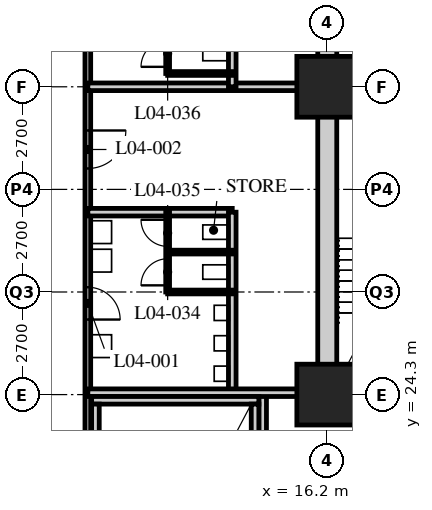
"""IFC4 building model, lengths in metres.
Left out: names, types, materials, properties, quantities, classifications, styles, units other than length and angle.
Written with IfcOpenShell. Run it as: python <this file> out.ifc"""

import sys

from ifc_helpers import new_model, si_unit, direction, frame, frame_2d, origin, origin_2d, place, context, subcontext, project, spatial, rectangle, hollow_rectangle, extrude, element, fill, save


model = new_model("IFC4")
c1 = context("Model", 3, precision=1e-05, world=origin(), true_north=direction((0.0, 1.0)))
c2 = subcontext(c1, "Body", "Model", "MODEL_VIEW")
j1 = project(units=[si_unit("LENGTHUNIT", "METRE"), si_unit("PLANEANGLEUNIT", "RADIAN")], contexts=[c1])
p1 = place(None, origin())
s1 = spatial("IfcSite", under=j1, at=p1, CompositionType="ELEMENT")
p2 = place(p1, origin())
s2 = spatial("IfcBuilding", under=s1, at=p2, CompositionType="ELEMENT")
p3 = place(p2, frame((0.0, 0.0, 22.2)))
s3 = spatial("IfcBuildingStorey", under=s2, at=p3, CompositionType="ELEMENT", Elevation=22.2)
for number, where, z_axis, x_axis in (
    (1, (16.2, 24.3, 0.0), (0.0, 0.0, 1.0), (1.0, 0.0, 0.0)),
    (2, (16.2, 32.4, 0.0), (0.0, 0.0, 1.0), (1.0, 0.0, 0.0)),
):
    element("IfcColumn", number, at=place(p3, frame(where, z_axis=z_axis, x_axis=x_axis)), inside=s3, PredefinedType="COLUMN", context=c2, shape_type="SweptSolid", body=[
        extrude(hollow_rectangle(XDim=1.6, YDim=1.6, WallThickness=0.15, at=origin_2d()), origin(), (0.0, 0.0, 1.0), 5.4),
    ])
p4 = place(p3, frame((9.9, 40.65, 0.0), z_axis=(0.0, 0.0, 1.0), x_axis=(0.0, -1.0, 0.0)))
e3 = element("IfcWall", 3, at=p4, inside=s3, PredefinedType="PARTITIONING", context=c2, shape_type="SweptSolid", body=[
    extrude(rectangle(XDim=30.75, YDim=0.15, at=frame_2d((15.375, 0.0))), origin(), (0.0, 0.0, 1.0), 5.19),
])
p5 = place(p4, frame((13.525, 0.0, 0.0)))
e4 = element("IfcOpeningElement", 4, at=p5, cuts=e3, PredefinedType="OPENING", context=c2, shape_type="SweptSolid", body=[
    extrude(rectangle(XDim=0.85, YDim=2.1, at=frame_2d((0.425, 1.05))), frame((0.0, 0.085, 0.0), z_axis=(0.0, -1.0, 0.0), x_axis=(1.0, 0.0, 0.0)), (0.0, 0.0, 1.0), 0.17),
])
p6 = place(p4, frame((9.4, 0.0, 0.0)))
e5 = element("IfcOpeningElement", 5, at=p6, cuts=e3, PredefinedType="OPENING", context=c2, shape_type="SweptSolid", body=[
    extrude(rectangle(XDim=1.0, YDim=2.1, at=frame_2d((0.5, 1.05))), frame((0.0, 0.085, 0.0), z_axis=(0.0, -1.0, 0.0), x_axis=(1.0, 0.0, 0.0)), (0.0, 0.0, 1.0), 0.17),
])
p7 = place(p4, frame((5.025, 0.0, 0.0)))
e6 = element("IfcOpeningElement", 6, at=p7, cuts=e3, PredefinedType="OPENING", context=c2, shape_type="SweptSolid", body=[
    extrude(rectangle(XDim=0.85, YDim=2.1, at=frame_2d((0.425, 1.05))), frame((0.0, 0.085, 0.0), z_axis=(0.0, -1.0, 0.0), x_axis=(1.0, 0.0, 0.0)), (0.0, 0.0, 1.0), 0.17),
])
p8 = place(p4, frame((0.9, 0.0, 0.0)))
e7 = element("IfcOpeningElement", 7, at=p8, cuts=e3, PredefinedType="OPENING", context=c2, shape_type="SweptSolid", body=[
    extrude(rectangle(XDim=1.0, YDim=2.1, at=frame_2d((0.5, 1.05))), frame((0.0, 0.085, 0.0), z_axis=(0.0, -1.0, 0.0), x_axis=(1.0, 0.0, 0.0)), (0.0, 0.0, 1.0), 0.17),
])
p9 = place(p3, frame((9.9, 32.4, 0.0), z_axis=(0.0, 0.0, 1.0), x_axis=(1.0, 0.0, 0.0)))
e8 = element("IfcWall", 8, at=p9, inside=s3, PredefinedType="SOLIDWALL", context=c2, shape_type="SweptSolid", body=[
    extrude(rectangle(XDim=6.3, YDim=0.2, at=frame_2d((3.15, 0.0))), origin(), (0.0, 0.0, 1.0), 4.428),
])
p10 = place(p3, frame((9.9, 29.1, 0.0), z_axis=(0.0, 0.0, 1.0), x_axis=(1.0, 0.0, 0.0)))
e9 = element("IfcWall", 9, at=p10, inside=s3, PredefinedType="SOLIDWALL", context=c2, shape_type="SweptSolid", body=[
    extrude(rectangle(XDim=3.8, YDim=0.2, at=frame_2d((1.9, 0.0))), origin(), (0.0, 0.0, 1.0), 5.19),
])
p11 = place(p3, frame((13.7, 24.3, 0.0), z_axis=(0.0, 0.0, 1.0), x_axis=(0.0, 1.0, 0.0)))
e10 = element("IfcWall", 10, at=p11, inside=s3, PredefinedType="SOLIDWALL", context=c2, shape_type="SweptSolid", body=[
    extrude(rectangle(XDim=4.8, YDim=0.2, at=frame_2d((2.4, 0.0))), origin(), (0.0, 0.0, 1.0), 5.19),
])
p12 = place(p3, frame((13.7, 32.4, 0.0), z_axis=(0.0, 0.0, 1.0), x_axis=(0.0, 1.0, 0.0)))
e11 = element("IfcWall", 11, at=p12, inside=s3, PredefinedType="SOLIDWALL", context=c2, shape_type="SweptSolid", body=[
    extrude(rectangle(XDim=5.6, YDim=0.2, at=frame_2d((2.8, 0.0))), origin(), (0.0, 0.0, 1.0), 5.19),
])
p13 = place(p3, frame((14.5, 9.9, 0.0), z_axis=(0.0, 0.0, 1.0), x_axis=(0.0, 1.0, 0.0)))
e12 = element("IfcWall", 12, at=p13, inside=s3, PredefinedType="SOLIDWALL", context=c2, shape_type="SweptSolid", body=[
    extrude(rectangle(XDim=14.4, YDim=0.2, at=frame_2d((7.2, 0.0))), origin(), (0.0, 0.0, 1.0), 5.19),
])
p14 = place(p3, frame((9.9, 24.35, 0.0), z_axis=(0.0, 0.0, 1.0), x_axis=(1.0, 0.0, 0.0)))
e13 = element("IfcWall", 13, at=p14, inside=s3, PredefinedType="SOLIDWALL", context=c2, shape_type="SweptSolid", body=[
    extrude(rectangle(XDim=6.3, YDim=0.2, at=frame_2d((3.15, 0.0))), origin(), (0.0, 0.0, 1.0), 4.428),
])
p15 = place(p3, frame((12.0, 27.0, 0.0), z_axis=(0.0, 0.0, 1.0), x_axis=(0.0, 1.0, 0.0)))
e14 = element("IfcWall", 14, at=p15, inside=s3, PredefinedType="PARTITIONING", context=c2, shape_type="SweptSolid", body=[
    extrude(rectangle(XDim=2.1, YDim=0.1, at=frame_2d((1.05, 0.0))), origin(), (0.0, 0.0, 1.0), 5.19),
])
p16 = place(p15, frame((0.175, 0.0, 0.0)))
e15 = element("IfcOpeningElement", 15, at=p16, cuts=e14, PredefinedType="OPENING", context=c2, shape_type="SweptSolid", body=[
    extrude(rectangle(XDim=0.7, YDim=2.0, at=frame_2d((0.35, 1.0))), frame((0.0, 0.06, 0.0), z_axis=(0.0, -1.0, 0.0), x_axis=(1.0, 0.0, 0.0)), (0.0, 0.0, 1.0), 0.12),
])
p17 = place(p15, frame((1.2, 0.0, 0.0)))
e16 = element("IfcOpeningElement", 16, at=p17, cuts=e14, PredefinedType="OPENING", context=c2, shape_type="SweptSolid", body=[
    extrude(rectangle(XDim=0.7, YDim=2.0, at=frame_2d((0.35, 1.0))), frame((0.0, 0.06, 0.0), z_axis=(0.0, -1.0, 0.0), x_axis=(1.0, 0.0, 0.0)), (0.0, 0.0, 1.0), 0.12),
])
for number, where, z_axis, x_axis in (
    (17, (12.0, 27.0, 0.0), (0.0, 0.0, 1.0), (1.0, 0.0, 0.0)),
    (18, (12.0, 28.05, 0.0), (0.0, 0.0, 1.0), (1.0, 0.0, 0.0)),
):
    element("IfcWall", number, at=place(p3, frame(where, z_axis=z_axis, x_axis=x_axis)), inside=s3, PredefinedType="PARTITIONING", context=c2, shape_type="SweptSolid", body=[
        extrude(rectangle(XDim=1.7, YDim=0.1, at=frame_2d((0.85, 0.0))), origin(), (0.0, 0.0, 1.0), 5.19),
    ])
p18 = place(p3, frame((12.0, 32.75, 0.0), z_axis=(0.0, 0.0, 1.0), x_axis=(0.0, 1.0, 0.0)))
e19 = element("IfcWall", 19, at=p18, inside=s3, PredefinedType="PARTITIONING", context=c2, shape_type="SweptSolid", body=[
    extrude(rectangle(XDim=5.25, YDim=0.1, at=frame_2d((2.625, 0.0))), origin(), (0.0, 0.0, 1.0), 5.19),
])
p19 = place(p18, frame((0.175, 0.0, 0.0)))
e20 = element("IfcOpeningElement", 20, at=p19, cuts=e19, PredefinedType="OPENING", context=c2, shape_type="SweptSolid", body=[
    extrude(rectangle(XDim=0.7, YDim=2.0, at=frame_2d((0.35, 1.0))), frame((0.0, 0.06, 0.0), z_axis=(0.0, -1.0, 0.0), x_axis=(1.0, 0.0, 0.0)), (0.0, 0.0, 1.0), 0.12),
])
p20 = place(p18, frame((1.225, 0.0, 0.0)))
e21 = element("IfcOpeningElement", 21, at=p20, cuts=e19, PredefinedType="OPENING", context=c2, shape_type="SweptSolid", body=[
    extrude(rectangle(XDim=0.7, YDim=2.0, at=frame_2d((0.35, 1.0))), frame((0.0, 0.06, 0.0), z_axis=(0.0, -1.0, 0.0), x_axis=(1.0, 0.0, 0.0)), (0.0, 0.0, 1.0), 0.12),
])
p21 = place(p18, frame((2.275, 0.0, 0.0)))
e22 = element("IfcOpeningElement", 22, at=p21, cuts=e19, PredefinedType="OPENING", context=c2, shape_type="SweptSolid", body=[
    extrude(rectangle(XDim=0.7, YDim=2.0, at=frame_2d((0.35, 1.0))), frame((0.0, 0.06, 0.0), z_axis=(0.0, -1.0, 0.0), x_axis=(1.0, 0.0, 0.0)), (0.0, 0.0, 1.0), 0.12),
])
p22 = place(p18, frame((3.325, 0.0, 0.0)))
e23 = element("IfcOpeningElement", 23, at=p22, cuts=e19, PredefinedType="OPENING", context=c2, shape_type="SweptSolid", body=[
    extrude(rectangle(XDim=0.7, YDim=2.0, at=frame_2d((0.35, 1.0))), frame((0.0, 0.06, 0.0), z_axis=(0.0, -1.0, 0.0), x_axis=(1.0, 0.0, 0.0)), (0.0, 0.0, 1.0), 0.12),
])
p23 = place(p18, frame((4.35, 0.0, 0.0)))
e24 = element("IfcOpeningElement", 24, at=p23, cuts=e19, PredefinedType="OPENING", context=c2, shape_type="SweptSolid", body=[
    extrude(rectangle(XDim=0.7, YDim=2.0, at=frame_2d((0.35, 1.0))), frame((0.0, 0.06, 0.0), z_axis=(0.0, -1.0, 0.0), x_axis=(1.0, 0.0, 0.0)), (0.0, 0.0, 1.0), 0.12),
])
p24 = place(p3, frame((12.0, 32.75, 0.0), z_axis=(0.0, 0.0, 1.0), x_axis=(1.0, 0.0, 0.0)))
e25 = element("IfcWall", 25, at=p24, inside=s3, PredefinedType="PARTITIONING", context=c2, shape_type="SweptSolid", body=[
    extrude(rectangle(XDim=1.7, YDim=0.1, at=frame_2d((0.85, 0.0))), origin(), (0.0, 0.0, 1.0), 5.19),
])
p25 = place(p3, frame((15.95, 24.3, 0.0), z_axis=(0.0, 0.0, 1.0), x_axis=(1.0, 0.0, 0.0)))
e26 = element("IfcWall", 26, at=p25, inside=s3, PredefinedType="SOLIDWALL", context=c2, shape_type="SweptSolid", body=[
    extrude(rectangle(XDim=24.8, YDim=0.5, at=frame_2d((12.4, 0.0))), origin(), (0.0, 0.0, 1.0), 4.428),
])
p26 = place(p25, frame((11.5, 0.0, 0.0)))
e27 = element("IfcOpeningElement", 27, at=p26, cuts=e26, PredefinedType="OPENING", context=c2, shape_type="SweptSolid", body=[
    extrude(rectangle(XDim=1.8, YDim=2.4, at=frame_2d((0.9, 1.2))), frame((0.0, 0.26, 0.0), z_axis=(0.0, -1.0, 0.0), x_axis=(1.0, 0.0, 0.0)), (0.0, 0.0, 1.0), 0.52),
])
p27 = place(p3, frame((16.2, 24.55, 0.0), z_axis=(0.0, 0.0, 1.0), x_axis=(0.0, 1.0, 0.0)))
e28 = element("IfcWall", 28, at=p27, inside=s3, PredefinedType="SOLIDWALL", context=c2, shape_type="SweptSolid", body=[
    extrude(rectangle(XDim=15.7, YDim=0.5, at=frame_2d((7.85, 0.0))), origin(), (0.0, 0.0, 1.0), 4.428),
])
p28 = place(p3, frame((16.45, 32.4, 0.0), z_axis=(0.0, 0.0, 1.0), x_axis=(1.0, 0.0, 0.0)))
e29 = element("IfcWall", 29, at=p28, inside=s3, PredefinedType="SOLIDWALL", context=c2, shape_type="SweptSolid", body=[
    extrude(rectangle(XDim=7.95, YDim=0.2, at=frame_2d((3.975, 0.0))), origin(), (0.0, 0.0, 1.0), 4.428),
])
p29 = place(p3, frame((10.0, 24.15, 0.0), z_axis=(0.0, 0.0, 1.0), x_axis=(1.0, 0.0, 0.0)))
e30 = element("IfcWall", 30, at=p29, inside=s3, PredefinedType="SOLIDWALL", context=c2, shape_type="SweptSolid", body=[
    extrude(rectangle(XDim=4.4, YDim=0.2, at=frame_2d((2.2, 0.0))), origin(), (0.0, 0.0, 1.0), 4.428),
])
for number, where, z_axis, x_axis in (
    (31, (10.1, 16.45, 0.0), (0.0, 0.0, 1.0), (0.0, 1.0, 0.0)),
    (32, (14.3, 16.45, 0.0), (0.0, 0.0, 1.0), (0.0, 1.0, 0.0)),
):
    element("IfcWall", number, at=place(p3, frame(where, z_axis=z_axis, x_axis=x_axis)), inside=s3, PredefinedType="SOLIDWALL", context=c2, shape_type="SweptSolid", body=[
        extrude(rectangle(XDim=7.6, YDim=0.2, at=frame_2d((3.8, 0.0))), origin(), (0.0, 0.0, 1.0), 5.19),
    ])
p30 = place(p5, origin())
e33 = element("IfcDoor", 33, at=p30, inside=s3, OperationType="SINGLE_SWING_RIGHT", PredefinedType="DOOR", context=c2, shape_type="SweptSolid", body=[
    extrude(rectangle(XDim=0.85, YDim=2.1, at=frame_2d((0.425, 1.05))), frame((0.0, 0.025, 0.0), z_axis=(0.0, -1.0, 0.0), x_axis=(1.0, 0.0, 0.0)), (0.0, 0.0, 1.0), 0.05),
])
fill(e4, e33)
p31 = place(p6, origin())
e34 = element("IfcDoor", 34, at=p31, inside=s3, OperationType="SINGLE_SWING_LEFT", PredefinedType="DOOR", context=c2, shape_type="SweptSolid", body=[
    extrude(rectangle(XDim=1.0, YDim=2.1, at=frame_2d((0.5, 1.05))), frame((0.0, 0.025, 0.0), z_axis=(0.0, -1.0, 0.0), x_axis=(1.0, 0.0, 0.0)), (0.0, 0.0, 1.0), 0.05),
])
fill(e5, e34)
p32 = place(p16, origin())
e35 = element("IfcDoor", 35, at=p32, inside=s3, OperationType="SINGLE_SWING_LEFT", PredefinedType="DOOR", context=c2, shape_type="SweptSolid", body=[
    extrude(rectangle(XDim=0.7, YDim=2.0, at=frame_2d((0.35, 1.0))), frame((0.0, 0.025, 0.0), z_axis=(0.0, -1.0, 0.0), x_axis=(1.0, 0.0, 0.0)), (0.0, 0.0, 1.0), 0.05),
])
fill(e15, e35)
p33 = place(p17, origin())
e36 = element("IfcDoor", 36, at=p33, inside=s3, OperationType="SINGLE_SWING_RIGHT", PredefinedType="DOOR", context=c2, shape_type="SweptSolid", body=[
    extrude(rectangle(XDim=0.7, YDim=2.0, at=frame_2d((0.35, 1.0))), frame((0.0, 0.025, 0.0), z_axis=(0.0, -1.0, 0.0), x_axis=(1.0, 0.0, 0.0)), (0.0, 0.0, 1.0), 0.05),
])
fill(e16, e36)
p34 = place(p19, origin())
e37 = element("IfcDoor", 37, at=p34, inside=s3, OperationType="SINGLE_SWING_LEFT", PredefinedType="DOOR", context=c2, shape_type="SweptSolid", body=[
    extrude(rectangle(XDim=0.7, YDim=2.0, at=frame_2d((0.35, 1.0))), frame((0.0, 0.025, 0.0), z_axis=(0.0, -1.0, 0.0), x_axis=(1.0, 0.0, 0.0)), (0.0, 0.0, 1.0), 0.05),
])
fill(e20, e37)
save(model, sys.argv[1])
